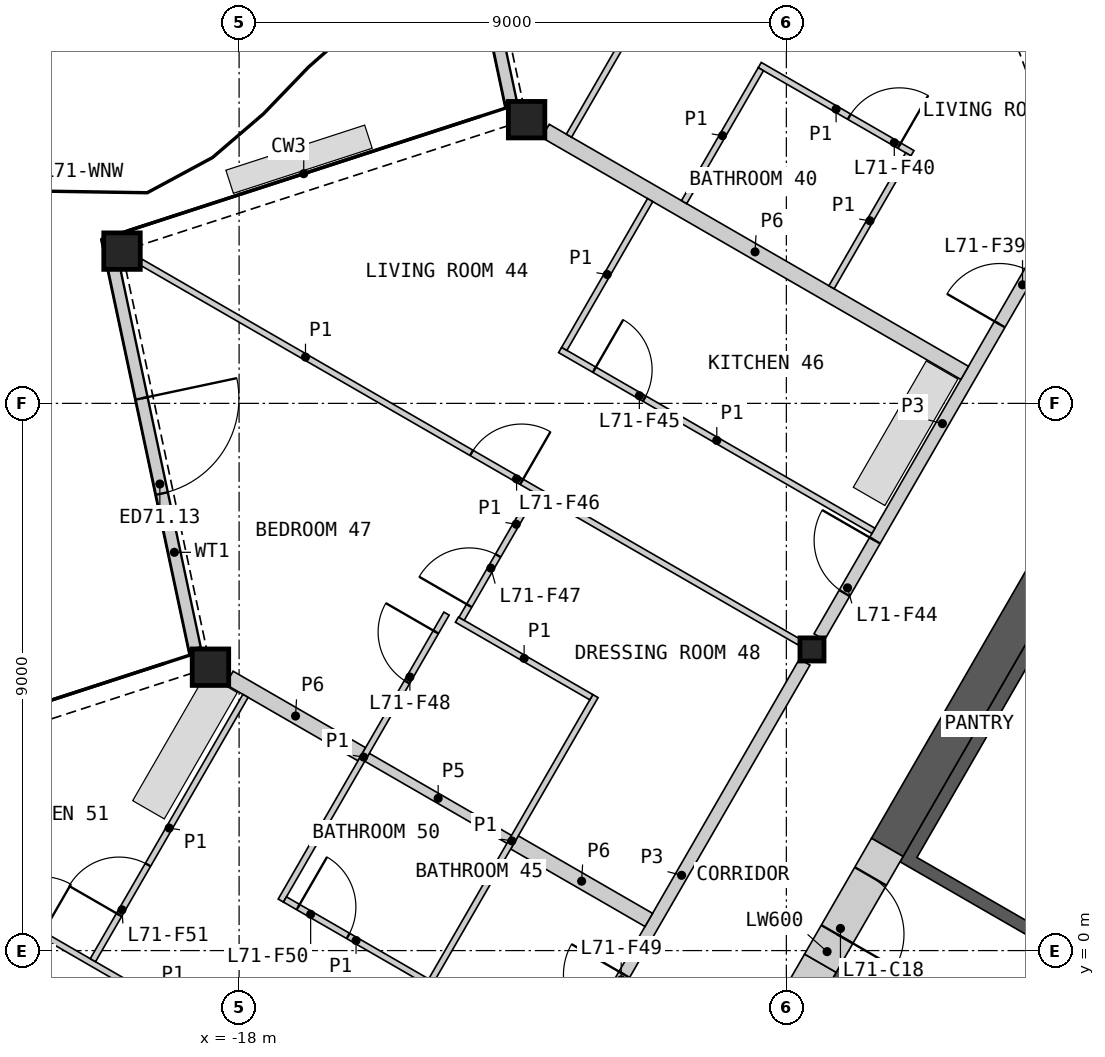
"""IFC4 building model, lengths in metres.
Left out: names, types, materials, properties, quantities, classifications, styles, units other than length and angle.
Written with IfcOpenShell. Run it as: python <this file> out.ifc"""

import sys

from ifc_helpers import new_model, si_unit, direction, frame, frame_2d, origin, origin_2d, place, context, subcontext, project, spatial, polyline, rectangle, hollow_rectangle, i_section, outline, extrude, element, fill, save


model = new_model("IFC4")
c1 = context("Model", 3, precision=1e-05, world=origin(), true_north=direction((0.0, 1.0)))
c2 = subcontext(c1, "Body", "Model", "MODEL_VIEW")
j1 = project(units=[si_unit("LENGTHUNIT", "METRE"), si_unit("PLANEANGLEUNIT", "RADIAN")], contexts=[c1])
p1 = place(None, origin())
s1 = spatial("IfcSite", under=j1, at=p1, CompositionType="ELEMENT")
p2 = place(p1, origin())
s2 = spatial("IfcBuilding", under=s1, at=p2, CompositionType="ELEMENT")
p3 = place(p2, frame((0.0, 0.0, 322.2)))
s3 = spatial("IfcBuildingStorey", under=s2, at=p3, CompositionType="ELEMENT", Elevation=322.2)
for number, where, z_axis, x_axis in (
    (1, (-13.272, 13.666, 0.0), (0.0, 0.0, 1.0), (1.0, 0.0, 0.0)),
    (2, (-19.926, 11.504, 0.0), (0.0, 0.0, 1.0), (1.0, 0.0, 0.0)),
    (3, (-18.471, 4.661, 0.0), (0.0, 0.0, 1.0), (1.0, 0.0, 0.0)),
):
    element("IfcColumn", number, at=place(p3, frame(where, z_axis=z_axis, x_axis=x_axis)), inside=s3, PredefinedType="COLUMN", context=c2, shape_type="SweptSolid", body=[
        extrude(hollow_rectangle(XDim=0.6, YDim=0.6, WallThickness=0.04, at=origin_2d()), origin(), (0.0, 0.0, 1.0), 3.4),
    ])
p4 = place(p3, frame((-8.578, 4.953, 0.0), z_axis=(0.0, 0.0, 1.0), x_axis=(1.0, 0.0, 0.0)))
e4 = element("IfcColumn", 4, at=p4, inside=s3, PredefinedType="COLUMN", context=c2, shape_type="SweptSolid", body=[
    extrude(i_section(OverallWidth=0.396, OverallDepth=0.381, WebThickness=0.019, FlangeThickness=0.03, at=origin_2d()), origin(), (0.0, 0.0, 1.0), 3.4),
])
p5 = place(p3, frame((-14.878, 20.292, 0.0), z_axis=(0.0, 0.0, 1.0), x_axis=(0.207943189785, -0.978140904892, 0.0)))
e5 = element("IfcWall", 5, at=p5, inside=s3, PredefinedType="SOLIDWALL", context=c2, shape_type="SweptSolid", body=[
    extrude(rectangle(XDim=6.467, YDim=0.2, at=frame_2d((3.233, 0.0))), origin(), (0.0, 0.0, 1.0), 2.488),
])
p6 = place(p5, frame((2.261, 0.0, 0.0)))
e6 = element("IfcOpeningElement", 6, at=p6, cuts=e5, PredefinedType="OPENING", context=c2, shape_type="SweptSolid", body=[
    extrude(rectangle(XDim=1.6, YDim=2.25, at=frame_2d((0.8, 1.125))), frame((0.0, 0.11, 0.0), z_axis=(0.0, -1.0, 0.0), x_axis=(1.0, 0.0, 0.0)), (0.0, 0.0, 1.0), 0.22),
])
p7 = place(p3, frame((-20.073, 11.294, 0.0), z_axis=(0.0, 0.0, 1.0), x_axis=(0.207893978909, -0.978151365349, 0.0)))
e7 = element("IfcWall", 7, at=p7, inside=s3, PredefinedType="SOLIDWALL", context=c2, shape_type="SweptSolid", body=[
    extrude(rectangle(XDim=6.466, YDim=0.2, at=frame_2d((3.233, 0.0))), origin(), (0.0, 0.0, 1.0), 2.488),
])
p8 = place(p7, frame((2.261, 0.0, 0.0)))
e8 = element("IfcOpeningElement", 8, at=p8, cuts=e7, PredefinedType="OPENING", context=c2, shape_type="SweptSolid", body=[
    extrude(rectangle(XDim=1.6, YDim=2.25, at=frame_2d((0.8, 1.125))), frame((0.0, 0.11, 0.0), z_axis=(0.0, -1.0, 0.0), x_axis=(1.0, 0.0, 0.0)), (0.0, 0.0, 1.0), 0.22),
])
p9 = place(p3, origin())
e9 = element("IfcWall", 9, at=p9, inside=s3, PredefinedType="SHEAR", context=c2, shape_type="SweptSolid", body=[
    extrude(outline(polyline([(-6.061, -1.697), (-8.231, -0.444), (-8.131, -0.271), (-5.96, -1.524), (-6.061, -1.697)])), origin(), (0.0, 0.0, 1.0), 3.1),
])
p10 = place(p3, origin())
e10 = element("IfcWall", 10, at=p10, inside=s3, PredefinedType="SHEAR", context=c2, shape_type="SweptSolid", body=[
    extrude(outline(polyline([(-4.96, 0.208), (-7.131, 1.461), (-3.731, 7.35), (-1.561, 6.097), (-1.66, 5.924), (-3.652, 7.074), (-6.852, 1.531), (-4.861, 0.381), (-4.96, 0.208)])), origin(), (0.0, 0.0, 1.0), 3.1),
])
p11 = place(p3, frame((-3.794, 7.84, 0.0), z_axis=(0.0, 0.0, 1.0), x_axis=(-0.499974747889, -0.866039982607, 0.0)))
e11 = element("IfcWall", 11, at=p11, inside=s3, PredefinedType="SHEAR", context=c2, shape_type="SweptSolid", body=[
    extrude(rectangle(XDim=7.092, YDim=0.6, at=frame_2d((3.546, 0.0))), origin(), (0.0, 0.0, 1.0), 3.1),
])
p12 = place(p3, frame((-8.44, -0.208, 0.0), z_axis=(0.0, 0.0, 1.0), x_axis=(-0.499997052475, -0.866027105532, 0.0)))
e12 = element("IfcWall", 12, at=p12, inside=s3, PredefinedType="SHEAR", context=c2, shape_type="SweptSolid", body=[
    extrude(rectangle(XDim=3.001, YDim=0.6, at=frame_2d((1.501, 0.0))), origin(), (0.0, 0.0, 1.0), 3.1),
])
p13 = place(p12, frame((1.4, 0.0, 0.0)))
e13 = element("IfcOpeningElement", 13, at=p13, cuts=e12, PredefinedType="OPENING", context=c2, shape_type="SweptSolid", body=[
    extrude(rectangle(XDim=1.0, YDim=2.1, at=frame_2d((0.5, 1.05))), frame((0.0, 0.31, 0.0), z_axis=(0.0, -1.0, 0.0), x_axis=(1.0, 0.0, 0.0)), (0.0, 0.0, 1.0), 0.62),
])
p14 = place(p3, frame((-7.34, 1.698, 0.0), z_axis=(0.0, 0.0, 1.0), x_axis=(-0.50002983664, -0.866008176907, 0.0)))
e14 = element("IfcWall", 14, at=p14, inside=s3, PredefinedType="SHEAR", context=c2, shape_type="SweptSolid", body=[
    extrude(rectangle(XDim=2.2, YDim=0.6, at=frame_2d((1.1, 0.0))), origin(), (0.0, 0.0, 1.0), 3.1),
])
p15 = place(p14, frame((0.55, 0.0, 0.0)))
e15 = element("IfcOpeningElement", 15, at=p15, cuts=e14, PredefinedType="OPENING", context=c2, shape_type="SweptSolid", body=[
    extrude(rectangle(XDim=1.1, YDim=2.1, at=frame_2d((0.55, 1.05))), frame((0.0, 0.31, 0.0), z_axis=(0.0, -1.0, 0.0), x_axis=(1.0, 0.0, 0.0)), (0.0, 0.0, 1.0), 0.62),
])
p16 = place(p3, frame((-8.458, 5.16, 0.0), z_axis=(0.0, 0.0, 1.0), x_axis=(0.499984266882, 0.866034487114, 0.0)))
e16 = element("IfcWall", 16, at=p16, inside=s3, PredefinedType="PARTITIONING", context=c2, shape_type="SweptSolid", body=[
    extrude(rectangle(XDim=8.099, YDim=0.2, at=frame_2d((4.049, 0.0))), origin(), (0.0, 0.0, 1.0), 3.1),
])
p17 = place(p16, frame((5.935, 0.0, 0.0)))
e17 = element("IfcOpeningElement", 17, at=p17, cuts=e16, PredefinedType="OPENING", context=c2, shape_type="SweptSolid", body=[
    extrude(rectangle(XDim=1.0, YDim=2.1, at=frame_2d((0.5, 1.05))), frame((0.0, 0.11, 0.0), z_axis=(0.0, -1.0, 0.0), x_axis=(1.0, 0.0, 0.0)), (0.0, 0.0, 1.0), 0.22),
])
p18 = place(p16, frame((0.83, 0.0, 0.0)))
e18 = element("IfcOpeningElement", 18, at=p18, cuts=e16, PredefinedType="OPENING", context=c2, shape_type="SweptSolid", body=[
    extrude(rectangle(XDim=1.0, YDim=2.1, at=frame_2d((0.5, 1.05))), frame((0.0, 0.11, 0.0), z_axis=(0.0, -1.0, 0.0), x_axis=(1.0, 0.0, 0.0)), (0.0, 0.0, 1.0), 0.22),
])
p19 = place(p3, frame((-12.748, -2.269, 0.0), z_axis=(0.0, 0.0, 1.0), x_axis=(0.499984266882, 0.866034487114, 0.0)))
e19 = element("IfcWall", 19, at=p19, inside=s3, PredefinedType="PARTITIONING", context=c2, shape_type="SweptSolid", body=[
    extrude(rectangle(XDim=8.099, YDim=0.2, at=frame_2d((4.049, 0.0))), origin(), (0.0, 0.0, 1.0), 3.1),
])
p20 = place(p19, frame((1.164, 0.0, 0.0)))
e20 = element("IfcOpeningElement", 20, at=p20, cuts=e19, PredefinedType="OPENING", context=c2, shape_type="SweptSolid", body=[
    extrude(rectangle(XDim=1.0, YDim=2.1, at=frame_2d((0.5, 1.05))), frame((0.0, 0.11, 0.0), z_axis=(0.0, -1.0, 0.0), x_axis=(1.0, 0.0, 0.0)), (0.0, 0.0, 1.0), 0.22),
])
p21 = place(p3, frame((-12.962, 13.482, 0.0), z_axis=(0.0, 0.0, 1.0), x_axis=(0.866022671543, -0.50000473235, 0.0)))
e21 = element("IfcWall", 21, at=p21, inside=s3, PredefinedType="PARTITIONING", context=c2, shape_type="SweptSolid", body=[
    extrude(rectangle(XDim=7.961, YDim=0.25, at=frame_2d((3.98, 0.0))), origin(), (0.0, 0.0, 1.0), 2.33),
])
p22 = place(p3, frame((-13.471, 1.779, 0.0), z_axis=(0.0, 0.0, 1.0), x_axis=(0.865989465428, -0.500062241894, 0.0)))
e22 = element("IfcWall", 22, at=p22, inside=s3, PredefinedType="PARTITIONING", context=c2, shape_type="SweptSolid", body=[
    extrude(rectangle(XDim=2.55, YDim=0.25, at=frame_2d((1.275, 0.0))), origin(), (0.0, 0.0, 1.0), 2.33),
])
p23 = place(p3, frame((-18.161, 4.487, 0.0), z_axis=(0.0, 0.0, 1.0), x_axis=(0.866012646713, -0.500022095245, 0.0)))
e23 = element("IfcWall", 23, at=p23, inside=s3, PredefinedType="PARTITIONING", context=c2, shape_type="SweptSolid", body=[
    extrude(rectangle(XDim=2.516, YDim=0.25, at=frame_2d((1.258, 0.0))), origin(), (0.0, 0.0, 1.0), 2.33),
])
p24 = place(p3, frame((-15.896, 3.179, 0.0), z_axis=(0.0, 0.0, 1.0), x_axis=(0.866059108428, -0.4999416173, 0.0)))
e24 = element("IfcWall", 24, at=p24, inside=s3, PredefinedType="PLUMBINGWALL", context=c2, shape_type="SweptSolid", body=[
    extrude(rectangle(XDim=2.7, YDim=0.15, at=frame_2d((1.35, 0.0))), origin(), (0.0, 0.0, 1.0), 2.33),
])
p25 = place(p3, frame((-24.815, 2.33, 0.0), z_axis=(0.0, 0.0, 1.0), x_axis=(0.866027776657, -0.499995890042, 0.0)))
e25 = element("IfcWall", 25, at=p25, inside=s3, PredefinedType="PARTITIONING", context=c2, shape_type="SweptSolid", body=[
    extrude(rectangle(XDim=12.649, YDim=0.1, at=frame_2d((6.325, 0.0))), origin(), (0.0, 0.0, 1.0), 2.33),
])
p26 = place(p25, frame((3.176, 0.0, 0.0)))
e26 = element("IfcOpeningElement", 26, at=p26, cuts=e25, PredefinedType="OPENING", context=c2, shape_type="SweptSolid", body=[
    extrude(rectangle(XDim=0.95, YDim=2.1, at=frame_2d((0.475, 1.05))), frame((0.0, 0.06, 0.0), z_axis=(0.0, -1.0, 0.0), x_axis=(1.0, 0.0, 0.0)), (0.0, 0.0, 1.0), 0.12),
])
p27 = place(p3, frame((-14.417, 20.32, 0.0), z_axis=(0.0, 0.0, 1.0), x_axis=(0.866021216079, -0.500007253249, 0.0)))
e27 = element("IfcWall", 27, at=p27, inside=s3, PredefinedType="PARTITIONING", context=c2, shape_type="SweptSolid", body=[
    extrude(rectangle(XDim=12.639, YDim=0.1, at=frame_2d((6.32, 0.0))), origin(), (0.0, 0.0, 1.0), 2.33),
])
p28 = place(p27, frame((3.375, 0.0, 0.0)))
e28 = element("IfcOpeningElement", 28, at=p28, cuts=e27, PredefinedType="OPENING", context=c2, shape_type="SweptSolid", body=[
    extrude(rectangle(XDim=0.95, YDim=2.1, at=frame_2d((0.475, 1.05))), frame((0.0, 0.06, 0.0), z_axis=(0.0, -1.0, 0.0), x_axis=(1.0, 0.0, 0.0)), (0.0, 0.0, 1.0), 0.12),
])
p29 = place(p3, frame((-19.615, 11.325, 0.0), z_axis=(0.0, 0.0, 1.0), x_axis=(0.86602139559, -0.500006942333, 0.0)))
e29 = element("IfcWall", 29, at=p29, inside=s3, PredefinedType="PARTITIONING", context=c2, shape_type="SweptSolid", body=[
    extrude(rectangle(XDim=12.505, YDim=0.1, at=frame_2d((6.252, 0.0))), origin(), (0.0, 0.0, 1.0), 2.33),
])
p30 = place(p29, frame((6.28, 0.0, 0.0)))
e30 = element("IfcOpeningElement", 30, at=p30, cuts=e29, PredefinedType="OPENING", context=c2, shape_type="SweptSolid", body=[
    extrude(rectangle(XDim=0.95, YDim=2.1, at=frame_2d((0.475, 1.05))), frame((0.0, 0.06, 0.0), z_axis=(0.0, -1.0, 0.0), x_axis=(1.0, 0.0, 0.0)), (0.0, 0.0, 1.0), 0.12),
])
p31 = place(p3, frame((-12.721, 9.878, 0.0), z_axis=(0.0, 0.0, 1.0), x_axis=(0.866027751316, -0.499995933934, 0.0)))
e31 = element("IfcWall", 31, at=p31, inside=s3, PredefinedType="PARTITIONING", context=c2, shape_type="SweptSolid", body=[
    extrude(rectangle(XDim=5.95, YDim=0.1, at=frame_2d((2.975, 0.0))), origin(), (0.0, 0.0, 1.0), 2.33),
])
p32 = place(p31, frame((0.65, 0.0, 0.0)))
e32 = element("IfcOpeningElement", 32, at=p32, cuts=e31, PredefinedType="OPENING", context=c2, shape_type="SweptSolid", body=[
    extrude(rectangle(XDim=0.95, YDim=2.1, at=frame_2d((0.475, 1.05))), frame((0.0, 0.06, 0.0), z_axis=(0.0, -1.0, 0.0), x_axis=(1.0, 0.0, 0.0)), (0.0, 0.0, 1.0), 0.12),
])
p33 = place(p3, frame((-17.314, 0.823, 0.0), z_axis=(0.0, 0.0, 1.0), x_axis=(0.499988730927, 0.866031909889, 0.0)))
e33 = element("IfcWall", 33, at=p33, inside=s3, PredefinedType="PARTITIONING", context=c2, shape_type="SweptSolid", body=[
    extrude(rectangle(XDim=5.45, YDim=0.1, at=frame_2d((2.725, 0.0))), origin(), (0.0, 0.0, 1.0), 2.33),
])
p34 = place(p33, frame((4.15, 0.0, 0.0)))
e34 = element("IfcOpeningElement", 34, at=p34, cuts=e33, PredefinedType="OPENING", context=c2, shape_type="SweptSolid", body=[
    extrude(rectangle(XDim=0.95, YDim=2.1, at=frame_2d((0.475, 1.05))), frame((0.0, 0.06, 0.0), z_axis=(0.0, -1.0, 0.0), x_axis=(1.0, 0.0, 0.0)), (0.0, 0.0, 1.0), 0.12),
])
p35 = place(p3, frame((-14.889, -0.577, 0.0), z_axis=(0.0, 0.0, 1.0), x_axis=(0.500015767406, 0.866016300277, 0.0)))
e35 = element("IfcWall", 35, at=p35, inside=s3, PredefinedType="PARTITIONING", context=c2, shape_type="SweptSolid", body=[
    extrude(rectangle(XDim=5.5, YDim=0.1, at=frame_2d((2.75, 0.0))), origin(), (0.0, 0.0, 1.0), 2.33),
])
p36 = place(p3, frame((-12.575, 13.403, 0.0), z_axis=(0.0, 0.0, 1.0), x_axis=(0.499989096993, 0.866031698547, 0.0)))
e36 = element("IfcWall", 36, at=p36, inside=s3, PredefinedType="PARTITIONING", context=c2, shape_type="SweptSolid", body=[
    extrude(rectangle(XDim=5.02, YDim=0.1, at=frame_2d((2.51, 0.0))), origin(), (0.0, 0.0, 1.0), 2.33),
])
p37 = place(p36, frame((3.208, 0.0, 0.0)))
e37 = element("IfcOpeningElement", 37, at=p37, cuts=e36, PredefinedType="OPENING", context=c2, shape_type="SweptSolid", body=[
    extrude(rectangle(XDim=0.95, YDim=2.1, at=frame_2d((0.475, 1.05))), frame((0.0, 0.06, 0.0), z_axis=(0.0, -1.0, 0.0), x_axis=(1.0, 0.0, 0.0)), (0.0, 0.0, 1.0), 0.12),
])
p38 = place(p3, frame((-20.405, -0.158, 0.0), z_axis=(0.0, 0.0, 1.0), x_axis=(0.499989096993, 0.866031698547, 0.0)))
e38 = element("IfcWall", 38, at=p38, inside=s3, PredefinedType="PARTITIONING", context=c2, shape_type="SweptSolid", body=[
    extrude(rectangle(XDim=5.02, YDim=0.1, at=frame_2d((2.51, 0.0))), origin(), (0.0, 0.0, 1.0), 2.33),
])
p39 = place(p38, frame((0.862, 0.0, 0.0)))
e39 = element("IfcOpeningElement", 39, at=p39, cuts=e38, PredefinedType="OPENING", context=c2, shape_type="SweptSolid", body=[
    extrude(rectangle(XDim=0.95, YDim=2.1, at=frame_2d((0.475, 1.05))), frame((0.0, 0.06, 0.0), z_axis=(0.0, -1.0, 0.0), x_axis=(1.0, 0.0, 0.0)), (0.0, 0.0, 1.0), 0.12),
])
p40 = place(p3, frame((-12.652, 9.897, 0.0), z_axis=(0.0, 0.0, 1.0), x_axis=(0.500024172624, 0.866011447264, 0.0)))
e40 = element("IfcWall", 40, at=p40, inside=s3, PredefinedType="PARTITIONING", context=c2, shape_type="SweptSolid", body=[
    extrude(rectangle(XDim=2.825, YDim=0.1, at=frame_2d((1.413, 0.0))), origin(), (0.0, 0.0, 1.0), 2.33),
])
p41 = place(p3, frame((-9.438, 14.565, 0.0), z_axis=(0.0, 0.0, 1.0), x_axis=(0.866032775405, -0.499987231761, 0.0)))
e41 = element("IfcWall", 41, at=p41, inside=s3, PredefinedType="PARTITIONING", context=c2, shape_type="SweptSolid", body=[
    extrude(rectangle(XDim=2.9, YDim=0.1, at=frame_2d((1.45, 0.0))), origin(), (0.0, 0.0, 1.0), 2.33),
])
p42 = place(p41, frame((1.7, 0.0, 0.0)))
e42 = element("IfcOpeningElement", 42, at=p42, cuts=e41, PredefinedType="OPENING", context=c2, shape_type="SweptSolid", body=[
    extrude(rectangle(XDim=0.95, YDim=2.1, at=frame_2d((0.475, 1.05))), frame((0.0, 0.06, 0.0), z_axis=(0.0, -1.0, 0.0), x_axis=(1.0, 0.0, 0.0)), (0.0, 0.0, 1.0), 0.12),
])
p43 = place(p3, frame((-17.246, 0.841, 0.0), z_axis=(0.0, 0.0, 1.0), x_axis=(0.86599734893, -0.500048589285, 0.0)))
e43 = element("IfcWall", 43, at=p43, inside=s3, PredefinedType="PARTITIONING", context=c2, shape_type="SweptSolid", body=[
    extrude(rectangle(XDim=2.7, YDim=0.1, at=frame_2d((1.35, 0.0))), origin(), (0.0, 0.0, 1.0), 2.33),
])
p44 = place(p43, frame((0.25, 0.0, 0.0)))
e44 = element("IfcOpeningElement", 44, at=p44, cuts=e43, PredefinedType="OPENING", context=c2, shape_type="SweptSolid", body=[
    extrude(rectangle(XDim=0.95, YDim=2.1, at=frame_2d((0.475, 1.05))), frame((0.0, 0.06, 0.0), z_axis=(0.0, -1.0, 0.0), x_axis=(1.0, 0.0, 0.0)), (0.0, 0.0, 1.0), 0.12),
])
for number, where, z_axis, x_axis in (
    (45, (-10.682, 12.31, 0.0), (0.0, 0.0, 1.0), (0.5, 0.866, 0.0)),
    (46, (-8.257, 10.91, 0.0), (0.0, 0.0, 1.0), (0.5, 0.866, 0.0)),
):
    element("IfcWall", number, at=place(p3, frame(where, z_axis=z_axis, x_axis=x_axis)), inside=s3, PredefinedType="PARTITIONING", context=c2, shape_type="SweptSolid", body=[
        extrude(rectangle(XDim=2.525, YDim=0.1, at=frame_2d((1.262, 0.0))), origin(), (0.0, 0.0, 1.0), 2.33),
    ])
p45 = place(p3, frame((-14.417, 5.443, 0.0), z_axis=(0.0, 0.0, 1.0), x_axis=(0.865991210529, -0.500059219779, 0.0)))
e47 = element("IfcWall", 47, at=p45, inside=s3, PredefinedType="PARTITIONING", context=c2, shape_type="SweptSolid", body=[
    extrude(rectangle(XDim=2.552, YDim=0.1, at=frame_2d((1.276, 0.0))), origin(), (0.0, 0.0, 1.0), 2.33),
])
p46 = place(p3, frame((-14.341, 5.457, 0.0), z_axis=(0.0, 0.0, 1.0), x_axis=(0.499954846121, 0.866051471819, 0.0)))
e48 = element("IfcWall", 48, at=p46, inside=s3, PredefinedType="PARTITIONING", context=c2, shape_type="SweptSolid", body=[
    extrude(rectangle(XDim=2.395, YDim=0.1, at=frame_2d((1.197, 0.0))), origin(), (0.0, 0.0, 1.0), 2.33),
])
p47 = place(p46, frame((0.25, 0.0, 0.0)))
e49 = element("IfcOpeningElement", 49, at=p47, cuts=e48, PredefinedType="OPENING", context=c2, shape_type="SweptSolid", body=[
    extrude(rectangle(XDim=0.95, YDim=2.1, at=frame_2d((0.475, 1.05))), frame((0.0, 0.06, 0.0), z_axis=(0.0, -1.0, 0.0), x_axis=(1.0, 0.0, 0.0)), (0.0, 0.0, 1.0), 0.12),
])
p48 = place(p8, origin())
e50 = element("IfcDoor", 50, at=p48, inside=s3, OperationType="DOUBLE_DOOR_SINGLE_SWING", PredefinedType="DOOR", context=c2, shape_type="SweptSolid", body=[
    extrude(rectangle(XDim=1.6, YDim=2.25, at=frame_2d((0.8, 1.125))), frame((0.0, 0.025, 0.0), z_axis=(0.0, -1.0, 0.0), x_axis=(1.0, 0.0, 0.0)), (0.0, 0.0, 1.0), 0.05),
])
fill(e8, e50)
p49 = place(p15, origin())
e51 = element("IfcDoor", 51, at=p49, inside=s3, OperationType="SINGLE_SWING_RIGHT", PredefinedType="DOOR", context=c2, shape_type="SweptSolid", body=[
    extrude(rectangle(XDim=1.1, YDim=2.1, at=frame_2d((0.55, 1.05))), frame((0.0, 0.055, 0.0), z_axis=(0.0, -1.0, 0.0), x_axis=(1.0, 0.0, 0.0)), (0.0, 0.0, 1.0), 0.05),
])
fill(e15, e51)
p50 = place(p17, origin())
e52 = element("IfcDoor", 52, at=p50, inside=s3, OperationType="SINGLE_SWING_LEFT", PredefinedType="DOOR", context=c2, shape_type="SweptSolid", body=[
    extrude(rectangle(XDim=1.0, YDim=2.1, at=frame_2d((0.5, 1.05))), frame((0.0, 0.025, 0.0), z_axis=(0.0, -1.0, 0.0), x_axis=(1.0, 0.0, 0.0)), (0.0, 0.0, 1.0), 0.05),
])
fill(e17, e52)
p51 = place(p42, origin())
e53 = element("IfcDoor", 53, at=p51, inside=s3, OperationType="SINGLE_SWING_RIGHT", PredefinedType="DOOR", context=c2, shape_type="SweptSolid", body=[
    extrude(rectangle(XDim=0.95, YDim=2.1, at=frame_2d((0.475, 1.05))), frame((0.0, 0.025, 0.0), z_axis=(0.0, -1.0, 0.0), x_axis=(1.0, 0.0, 0.0)), (0.0, 0.0, 1.0), 0.05),
])
fill(e42, e53)
p52 = place(p18, origin())
e54 = element("IfcDoor", 54, at=p52, inside=s3, OperationType="SINGLE_SWING_RIGHT", PredefinedType="DOOR", context=c2, shape_type="SweptSolid", body=[
    extrude(rectangle(XDim=1.0, YDim=2.1, at=frame_2d((0.5, 1.05))), frame((0.0, 0.025, 0.0), z_axis=(0.0, -1.0, 0.0), x_axis=(1.0, 0.0, 0.0)), (0.0, 0.0, 1.0), 0.05),
])
fill(e18, e54)
p53 = place(p32, origin())
e55 = element("IfcDoor", 55, at=p53, inside=s3, OperationType="SINGLE_SWING_LEFT", PredefinedType="DOOR", context=c2, shape_type="SweptSolid", body=[
    extrude(rectangle(XDim=0.95, YDim=2.1, at=frame_2d((0.475, 1.05))), frame((0.0, 0.025, 0.0), z_axis=(0.0, -1.0, 0.0), x_axis=(1.0, 0.0, 0.0)), (0.0, 0.0, 1.0), 0.05),
])
fill(e32, e55)
p54 = place(p30, origin())
e56 = element("IfcDoor", 56, at=p54, inside=s3, OperationType="SINGLE_SWING_RIGHT", PredefinedType="DOOR", context=c2, shape_type="SweptSolid", body=[
    extrude(rectangle(XDim=0.95, YDim=2.1, at=frame_2d((0.475, 1.05))), frame((0.0, 0.025, 0.0), z_axis=(0.0, -1.0, 0.0), x_axis=(1.0, 0.0, 0.0)), (0.0, 0.0, 1.0), 0.05),
])
fill(e30, e56)
p55 = place(p47, origin())
e57 = element("IfcDoor", 57, at=p55, inside=s3, OperationType="SINGLE_SWING_LEFT", PredefinedType="DOOR", context=c2, shape_type="SweptSolid", body=[
    extrude(rectangle(XDim=0.95, YDim=2.1, at=frame_2d((0.475, 1.05))), frame((0.0, 0.025, 0.0), z_axis=(0.0, -1.0, 0.0), x_axis=(1.0, 0.0, 0.0)), (0.0, 0.0, 1.0), 0.05),
])
fill(e49, e57)
p56 = place(p34, origin())
e58 = element("IfcDoor", 58, at=p56, inside=s3, OperationType="SINGLE_SWING_RIGHT", PredefinedType="DOOR", context=c2, shape_type="SweptSolid", body=[
    extrude(rectangle(XDim=0.95, YDim=2.1, at=frame_2d((0.475, 1.05))), frame((0.0, 0.025, 0.0), z_axis=(0.0, -1.0, 0.0), x_axis=(1.0, 0.0, 0.0)), (0.0, 0.0, 1.0), 0.05),
])
fill(e34, e58)
p57 = place(p20, origin())
e59 = element("IfcDoor", 59, at=p57, inside=s3, OperationType="SINGLE_SWING_RIGHT", PredefinedType="DOOR", context=c2, shape_type="SweptSolid", body=[
    extrude(rectangle(XDim=1.0, YDim=2.1, at=frame_2d((0.5, 1.05))), frame((0.0, 0.025, 0.0), z_axis=(0.0, -1.0, 0.0), x_axis=(1.0, 0.0, 0.0)), (0.0, 0.0, 1.0), 0.05),
])
fill(e20, e59)
p58 = place(p44, origin())
e60 = element("IfcDoor", 60, at=p58, inside=s3, OperationType="SINGLE_SWING_LEFT", PredefinedType="DOOR", context=c2, shape_type="SweptSolid", body=[
    extrude(rectangle(XDim=0.95, YDim=2.1, at=frame_2d((0.475, 1.05))), frame((0.0, 0.025, 0.0), z_axis=(0.0, -1.0, 0.0), x_axis=(1.0, 0.0, 0.0)), (0.0, 0.0, 1.0), 0.05),
])
fill(e44, e60)
p59 = place(p39, origin())
e61 = element("IfcDoor", 61, at=p59, inside=s3, OperationType="SINGLE_SWING_LEFT", PredefinedType="DOOR", context=c2, shape_type="SweptSolid", body=[
    extrude(rectangle(XDim=0.95, YDim=2.1, at=frame_2d((0.475, 1.05))), frame((0.0, 0.025, 0.0), z_axis=(0.0, -1.0, 0.0), x_axis=(1.0, 0.0, 0.0)), (0.0, 0.0, 1.0), 0.05),
])
fill(e39, e61)
save(model, sys.argv[1])
